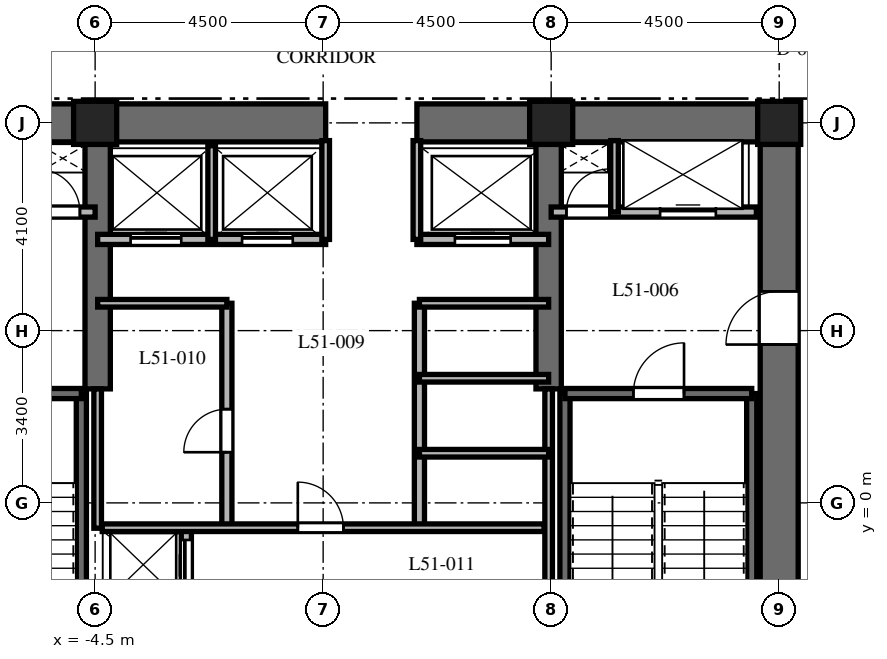
"""IFC4 building model, lengths in metres.
Left out: names, types, materials, properties, quantities, classifications, styles, units other than length and angle.
Written with IfcOpenShell. Run it as: python <this file> out.ifc"""

import sys

from ifc_helpers import new_model, si_unit, direction, frame, frame_2d, origin, origin_2d, place, context, subcontext, project, spatial, rectangle, extrude, element, fill, save


model = new_model("IFC4")
c1 = context("Model", 3, precision=1e-05, world=origin(), true_north=direction((0.0, 1.0)))
c2 = subcontext(c1, "Body", "Model", "MODEL_VIEW")
j1 = project(units=[si_unit("LENGTHUNIT", "METRE"), si_unit("PLANEANGLEUNIT", "RADIAN")], contexts=[c1])
p1 = place(None, origin())
s1 = spatial("IfcSite", under=j1, at=p1, CompositionType="ELEMENT")
p2 = place(p1, origin())
s2 = spatial("IfcBuilding", under=s1, at=p2, CompositionType="ELEMENT")
p3 = place(p2, frame((0.0, 0.0, 206.5)))
s3 = spatial("IfcBuildingStorey", under=s2, at=p3, CompositionType="ELEMENT", Elevation=206.5)
p4 = place(p3, frame((-9.375, 7.5, 0.0), z_axis=(0.0, 0.0, 1.0), x_axis=(1.0, 0.0, 0.0)))
e1 = element("IfcWall", 1, at=p4, inside=s3, PredefinedType="SHEAR", context=c2, shape_type="SweptSolid", body=[
    extrude(rectangle(XDim=9.425, YDim=0.75, at=frame_2d((4.712, 0.0))), origin(), (0.0, 0.0, 1.0), 3.8),
])
p5 = place(p3, frame((1.85, 7.5, 0.0), z_axis=(0.0, 0.0, 1.0), x_axis=(1.0, 0.0, 0.0)))
e2 = element("IfcWall", 2, at=p5, inside=s3, PredefinedType="SHEAR", context=c2, shape_type="SweptSolid", body=[
    extrude(rectangle(XDim=7.525, YDim=0.75, at=frame_2d((3.762, 0.0))), origin(), (0.0, 0.0, 1.0), 3.8),
])
p6 = place(p3, frame((9.0, -7.125, 0.0), z_axis=(0.0, 0.0, 1.0), x_axis=(0.0, 1.0, 0.0)))
e3 = element("IfcWall", 3, at=p6, inside=s3, PredefinedType="SHEAR", context=c2, shape_type="SweptSolid", body=[
    extrude(rectangle(XDim=14.25, YDim=0.75, at=frame_2d((7.125, 0.0))), origin(), (0.0, 0.0, 1.0), 3.8),
])
p7 = place(p6, frame((10.25, 0.0, 0.0)))
e4 = element("IfcOpeningElement", 4, at=p7, cuts=e3, PredefinedType="OPENING", context=c2, shape_type="SweptSolid", body=[
    extrude(rectangle(XDim=1.05, YDim=2.15, at=frame_2d((0.525, 1.075))), frame((0.0, 0.385, 0.0), z_axis=(0.0, -1.0, 0.0), x_axis=(1.0, 0.0, 0.0)), (0.0, 0.0, 1.0), 0.77),
])
for number, where, z_axis, x_axis in (
    (5, (-4.45, 2.25, 0.0), (0.0, 0.0, 1.0), (0.0, 1.0, 0.0)),
    (6, (4.45, 2.25, 0.0), (0.0, 0.0, 1.0), (0.0, 1.0, 0.0)),
):
    element("IfcWall", number, at=place(p3, frame(where, z_axis=z_axis, x_axis=x_axis)), inside=s3, PredefinedType="SHEAR", context=c2, shape_type="SweptSolid", body=[
        extrude(rectangle(XDim=4.875, YDim=0.5, at=frame_2d((2.438, 0.0))), origin(), (0.0, 0.0, 1.0), 3.8),
    ])
p8 = place(p3, frame((-4.772, -6.985, 0.0), z_axis=(0.0, 0.0, 1.0), x_axis=(0.0, 1.0, 0.0)))
e7 = element("IfcWall", 7, at=p8, inside=s3, PredefinedType="SHEAR", context=c2, shape_type="SweptSolid", body=[
    extrude(rectangle(XDim=9.143, YDim=0.2, at=frame_2d((4.572, 0.0))), origin(), (0.0, 0.0, 1.0), 3.8),
])
p9 = place(p3, frame((-8.458, 2.158, 0.0), z_axis=(0.0, 0.0, 1.0), x_axis=(1.0, 0.0, 0.0)))
e8 = element("IfcWall", 8, at=p9, inside=s3, PredefinedType="SHEAR", context=c2, shape_type="SweptSolid", body=[
    extrude(rectangle(XDim=3.686, YDim=0.2, at=frame_2d((1.843, 0.0))), origin(), (0.0, 0.0, 1.0), 3.8),
])
p10 = place(p9, frame((1.3, 0.0, 0.0)))
e9 = element("IfcOpeningElement", 9, at=p10, cuts=e8, PredefinedType="OPENING", context=c2, shape_type="SweptSolid", body=[
    extrude(rectangle(XDim=1.0, YDim=2.15, at=frame_2d((0.5, 1.075))), frame((0.0, 0.11, 0.0), z_axis=(0.0, -1.0, 0.0), x_axis=(1.0, 0.0, 0.0)), (0.0, 0.0, 1.0), 0.22),
])
for number, where, z_axis, x_axis in (
    (10, (4.772, -6.985, 0.0), (0.0, 0.0, 1.0), (0.0, 1.0, 0.0)),
    (11, (8.458, -6.985, 0.0), (0.0, 0.0, 1.0), (0.0, 1.0, 0.0)),
):
    element("IfcWall", number, at=place(p3, frame(where, z_axis=z_axis, x_axis=x_axis)), inside=s3, PredefinedType="SHEAR", context=c2, shape_type="SweptSolid", body=[
        extrude(rectangle(XDim=9.143, YDim=0.2, at=frame_2d((4.572, 0.0))), origin(), (0.0, 0.0, 1.0), 3.8),
    ])
p11 = place(p3, frame((4.772, 2.158, 0.0), z_axis=(0.0, 0.0, 1.0), x_axis=(1.0, 0.0, 0.0)))
e12 = element("IfcWall", 12, at=p11, inside=s3, PredefinedType="SHEAR", context=c2, shape_type="SweptSolid", body=[
    extrude(rectangle(XDim=3.686, YDim=0.2, at=frame_2d((1.843, 0.0))), origin(), (0.0, 0.0, 1.0), 3.8),
])
p12 = place(p11, frame((1.35, 0.0, 0.0)))
e13 = element("IfcOpeningElement", 13, at=p12, cuts=e12, PredefinedType="OPENING", context=c2, shape_type="SweptSolid", body=[
    extrude(rectangle(XDim=1.0, YDim=2.15, at=frame_2d((0.5, 1.075))), frame((0.0, 0.11, 0.0), z_axis=(0.0, -1.0, 0.0), x_axis=(1.0, 0.0, 0.0)), (0.0, 0.0, 1.0), 0.22),
])
for number, where, z_axis, x_axis in (
    (14, (9.0, 7.5, 0.0), (0.0, 0.0, 1.0), (1.0, 0.0, 0.0)),
    (15, (4.5, 7.5, 0.0), (0.0, 0.0, 1.0), (1.0, 0.0, 0.0)),
    (16, (-4.5, 7.5, 0.0), (0.0, 0.0, 1.0), (1.0, 0.0, 0.0)),
):
    element("IfcColumn", number, at=place(p3, frame(where, z_axis=z_axis, x_axis=x_axis)), inside=s3, PredefinedType="COLUMN", context=c2, shape_type="SweptSolid", body=[
        extrude(rectangle(XDim=0.85, YDim=0.85, at=origin_2d()), origin(), (0.0, 0.0, 1.0), 3.8),
    ])
p13 = place(p3, frame((-8.55, 5.74, 0.0), z_axis=(0.0, 0.0, 1.0), x_axis=(1.0, 0.0, 0.0)))
e17 = element("IfcWall", 17, at=p13, inside=s3, PredefinedType="PARTITIONING", context=c2, shape_type="SweptSolid", body=[
    extrude(rectangle(XDim=4.05, YDim=0.2, at=frame_2d((2.025, 0.0))), origin(), (0.0, 0.0, 1.0), 3.5),
])
p14 = place(p13, frame((0.75, 0.0, 0.0)))
e18 = element("IfcOpeningElement", 18, at=p14, cuts=e17, PredefinedType="OPENING", context=c2, shape_type="SweptSolid", body=[
    extrude(rectangle(XDim=1.1, YDim=2.2, at=frame_2d((0.55, 1.1))), frame((0.0, 0.11, 0.0), z_axis=(0.0, -1.0, 0.0), x_axis=(1.0, 0.0, 0.0)), (0.0, 0.0, 1.0), 0.22),
])
p15 = place(p13, frame((2.9, 0.0, 0.0)))
e19 = element("IfcOpeningElement", 19, at=p15, cuts=e17, PredefinedType="OPENING", context=c2, shape_type="SweptSolid", body=[
    extrude(rectangle(XDim=0.85, YDim=2.03, at=frame_2d((0.425, 1.015))), frame((0.0, 0.11, 0.0), z_axis=(0.0, -1.0, 0.0), x_axis=(1.0, 0.0, 0.0)), (0.0, 0.0, 1.0), 0.22),
])
p16 = place(p3, frame((4.5, 5.74, 0.0), z_axis=(0.0, 0.0, 1.0), x_axis=(1.0, 0.0, 0.0)))
e20 = element("IfcWall", 20, at=p16, inside=s3, PredefinedType="PARTITIONING", context=c2, shape_type="SweptSolid", body=[
    extrude(rectangle(XDim=4.05, YDim=0.2, at=frame_2d((2.025, 0.0))), origin(), (0.0, 0.0, 1.0), 3.5),
])
p17 = place(p16, frame((0.3, 0.0, 0.0)))
e21 = element("IfcOpeningElement", 21, at=p17, cuts=e20, PredefinedType="OPENING", context=c2, shape_type="SweptSolid", body=[
    extrude(rectangle(XDim=0.85, YDim=2.03, at=frame_2d((0.425, 1.015))), frame((0.0, 0.11, 0.0), z_axis=(0.0, -1.0, 0.0), x_axis=(1.0, 0.0, 0.0)), (0.0, 0.0, 1.0), 0.22),
])
p18 = place(p16, frame((2.15, 0.0, 0.0)))
e22 = element("IfcOpeningElement", 22, at=p18, cuts=e20, PredefinedType="OPENING", context=c2, shape_type="SweptSolid", body=[
    extrude(rectangle(XDim=1.1, YDim=2.2, at=frame_2d((0.55, 1.1))), frame((0.0, 0.11, 0.0), z_axis=(0.0, -1.0, 0.0), x_axis=(1.0, 0.0, 0.0)), (0.0, 0.0, 1.0), 0.22),
])
p19 = place(p3, frame((5.75, 5.74, 0.0), z_axis=(0.0, 0.0, 1.0), x_axis=(0.0, 1.0, 0.0)))
e23 = element("IfcWall", 23, at=p19, inside=s3, PredefinedType="PARTITIONING", context=c2, shape_type="SweptSolid", body=[
    extrude(rectangle(XDim=1.41, YDim=0.15, at=frame_2d((0.705, 0.0))), origin(), (0.0, 0.0, 1.0), 3.5),
])
p20 = place(p3, frame((-2.7, -1.972, 0.0), z_axis=(0.0, 0.0, 1.0), x_axis=(0.0, 1.0, 0.0)))
e24 = element("IfcWall", 24, at=p20, inside=s3, PredefinedType="PARTITIONING", context=c2, shape_type="SweptSolid", body=[
    extrude(rectangle(XDim=1.472, YDim=0.2, at=frame_2d((0.736, 0.0))), origin(), (0.0, 0.0, 1.0), 3.5),
])
p21 = place(p20, frame((0.24, 0.0, 0.0)))
e25 = element("IfcOpeningElement", 25, at=p21, cuts=e24, PredefinedType="OPENING", context=c2, shape_type="SweptSolid", body=[
    extrude(rectangle(XDim=1.0, YDim=2.2, at=frame_2d((0.5, 1.1))), frame((0.0, 0.11, 0.0), z_axis=(0.0, -1.0, 0.0), x_axis=(1.0, 0.0, 0.0)), (0.0, 0.0, 1.0), 0.22),
])
p22 = place(p3, frame((-4.45, 5.2, 0.0), z_axis=(0.0, 0.0, 1.0), x_axis=(1.0, 0.0, 0.0)))
e26 = element("IfcWall", 26, at=p22, inside=s3, PredefinedType="PARTITIONING", context=c2, shape_type="SweptSolid", body=[
    extrude(rectangle(XDim=4.5, YDim=0.2, at=frame_2d((2.25, 0.0))), origin(), (0.0, 0.0, 1.0), 3.5),
])
p23 = place(p22, frame((0.65, 0.0, 0.0)))
e27 = element("IfcOpeningElement", 27, at=p23, cuts=e26, PredefinedType="OPENING", context=c2, shape_type="SweptSolid", body=[
    extrude(rectangle(XDim=1.0, YDim=2.2, at=frame_2d((0.5, 1.1))), frame((0.0, 0.11, 0.0), z_axis=(0.0, -1.0, 0.0), x_axis=(1.0, 0.0, 0.0)), (0.0, 0.0, 1.0), 0.22),
])
p24 = place(p22, frame((2.85, 0.0, 0.0)))
e28 = element("IfcOpeningElement", 28, at=p24, cuts=e26, PredefinedType="OPENING", context=c2, shape_type="SweptSolid", body=[
    extrude(rectangle(XDim=1.0, YDim=2.2, at=frame_2d((0.5, 1.1))), frame((0.0, 0.11, 0.0), z_axis=(0.0, -1.0, 0.0), x_axis=(1.0, 0.0, 0.0)), (0.0, 0.0, 1.0), 0.22),
])
p25 = place(p3, frame((1.85, 5.2, 0.0), z_axis=(0.0, 0.0, 1.0), x_axis=(1.0, 0.0, 0.0)))
e29 = element("IfcWall", 29, at=p25, inside=s3, PredefinedType="PARTITIONING", context=c2, shape_type="SweptSolid", body=[
    extrude(rectangle(XDim=2.6, YDim=0.2, at=frame_2d((1.3, 0.0))), origin(), (0.0, 0.0, 1.0), 3.5),
])
p26 = place(p25, frame((0.75, 0.0, 0.0)))
e30 = element("IfcOpeningElement", 30, at=p26, cuts=e29, PredefinedType="OPENING", context=c2, shape_type="SweptSolid", body=[
    extrude(rectangle(XDim=1.1, YDim=2.2, at=frame_2d((0.55, 1.1))), frame((0.0, 0.11, 0.0), z_axis=(0.0, -1.0, 0.0), x_axis=(1.0, 0.0, 0.0)), (0.0, 0.0, 1.0), 0.22),
])
p27 = place(p3, frame((-2.2, 5.2, 0.0), z_axis=(0.0, 0.0, 1.0), x_axis=(0.0, 1.0, 0.0)))
e31 = element("IfcWall", 31, at=p27, inside=s3, PredefinedType="PARTITIONING", context=c2, shape_type="SweptSolid", body=[
    extrude(rectangle(XDim=1.85, YDim=0.15, at=frame_2d((0.925, 0.0))), origin(), (0.0, 0.0, 1.0), 3.5),
])
for number, where, z_axis, x_axis in (
    (32, (0.05, 5.2, 0.0), (0.0, 0.0, 1.0), (0.0, 1.0, 0.0)),
    (33, (1.85, 5.2, 0.0), (0.0, 0.0, 1.0), (0.0, 1.0, 0.0)),
):
    element("IfcWall", number, at=place(p3, frame(where, z_axis=z_axis, x_axis=x_axis)), inside=s3, PredefinedType="PARTITIONING", context=c2, shape_type="SweptSolid", body=[
        extrude(rectangle(XDim=1.95, YDim=0.15, at=frame_2d((0.975, 0.0))), origin(), (0.0, 0.0, 1.0), 3.5),
    ])
p28 = place(p3, frame((-4.45, -0.5, 0.0), z_axis=(0.0, 0.0, 1.0), x_axis=(0.0, 1.0, 0.0)))
e34 = element("IfcWall", 34, at=p28, inside=s3, PredefinedType="PARTITIONING", context=c2, shape_type="SweptSolid", body=[
    extrude(rectangle(XDim=2.75, YDim=0.15, at=frame_2d((1.375, 0.0))), origin(), (0.0, 0.0, 1.0), 3.5),
])
p29 = place(p3, frame((4.45, -1.972, 0.0), z_axis=(0.0, 0.0, 1.0), x_axis=(0.0, 1.0, 0.0)))
e35 = element("IfcWall", 35, at=p29, inside=s3, PredefinedType="PARTITIONING", context=c2, shape_type="SweptSolid", body=[
    extrude(rectangle(XDim=4.222, YDim=0.15, at=frame_2d((2.111, 0.0))), origin(), (0.0, 0.0, 1.0), 3.5),
])
p30 = place(p3, frame((-1.9, -0.5, 0.0), z_axis=(0.0, 0.0, 1.0), x_axis=(0.0, 1.0, 0.0)))
e36 = element("IfcWall", 36, at=p30, inside=s3, PredefinedType="PARTITIONING", context=c2, shape_type="SweptSolid", body=[
    extrude(rectangle(XDim=4.44, YDim=0.2, at=frame_2d((2.22, 0.0))), origin(), (0.0, 0.0, 1.0), 3.5),
])
p31 = place(p30, frame((1.5, 0.0, 0.0)))
e37 = element("IfcOpeningElement", 37, at=p31, cuts=e36, PredefinedType="OPENING", context=c2, shape_type="SweptSolid", body=[
    extrude(rectangle(XDim=0.85, YDim=2.03, at=frame_2d((0.425, 1.015))), frame((0.0, 0.11, 0.0), z_axis=(0.0, -1.0, 0.0), x_axis=(1.0, 0.0, 0.0)), (0.0, 0.0, 1.0), 0.22),
])
p32 = place(p3, frame((-4.45, 3.94, 0.0), z_axis=(0.0, 0.0, 1.0), x_axis=(1.0, 0.0, 0.0)))
e38 = element("IfcWall", 38, at=p32, inside=s3, PredefinedType="PARTITIONING", context=c2, shape_type="SweptSolid", body=[
    extrude(rectangle(XDim=2.55, YDim=0.15, at=frame_2d((1.275, 0.0))), origin(), (0.0, 0.0, 1.0), 3.5),
])
p33 = place(p3, frame((1.9, -0.5, 0.0), z_axis=(0.0, 0.0, 1.0), x_axis=(0.0, 1.0, 0.0)))
e39 = element("IfcWall", 39, at=p33, inside=s3, PredefinedType="PARTITIONING", context=c2, shape_type="SweptSolid", body=[
    extrude(rectangle(XDim=4.44, YDim=0.2, at=frame_2d((2.22, 0.0))), origin(), (0.0, 0.0, 1.0), 3.5),
])
for number, where, z_axis, x_axis in (
    (40, (1.9, 3.94, 0.0), (0.0, 0.0, 1.0), (1.0, 0.0, 0.0)),
    (41, (1.9, 0.98, 0.0), (0.0, 0.0, 1.0), (1.0, 0.0, 0.0)),
    (42, (1.9, 2.46, 0.0), (0.0, 0.0, 1.0), (1.0, 0.0, 0.0)),
):
    element("IfcWall", number, at=place(p3, frame(where, z_axis=z_axis, x_axis=x_axis)), inside=s3, PredefinedType="PARTITIONING", context=c2, shape_type="SweptSolid", body=[
        extrude(rectangle(XDim=2.55, YDim=0.15, at=frame_2d((1.275, 0.0))), origin(), (0.0, 0.0, 1.0), 3.5),
    ])
p34 = place(p3, frame((-4.36, -0.49, 0.0), z_axis=(0.0, 0.0, 1.0), x_axis=(1.0, 0.0, 0.0)))
e43 = element("IfcWall", 43, at=p34, inside=s3, PredefinedType="PARTITIONING", context=c2, shape_type="SweptSolid", body=[
    extrude(rectangle(XDim=8.72, YDim=0.15, at=frame_2d((4.36, 0.0))), origin(), (0.0, 0.0, 1.0), 3.5),
])
p35 = place(p34, frame((3.86, 0.0, 0.0)))
e44 = element("IfcOpeningElement", 44, at=p35, cuts=e43, PredefinedType="OPENING", context=c2, shape_type="SweptSolid", body=[
    extrude(rectangle(XDim=0.9, YDim=2.03, at=frame_2d((0.45, 1.015))), frame((0.0, 0.085, 0.0), z_axis=(0.0, -1.0, 0.0), x_axis=(1.0, 0.0, 0.0)), (0.0, 0.0, 1.0), 0.17),
])
p36 = place(p12, origin())
e45 = element("IfcDoor", 45, at=p36, inside=s3, OperationType="SINGLE_SWING_RIGHT", PredefinedType="DOOR", context=c2, shape_type="SweptSolid", body=[
    extrude(rectangle(XDim=1.0, YDim=2.15, at=frame_2d((0.5, 1.075))), frame((0.0, 0.025, 0.0), z_axis=(0.0, -1.0, 0.0), x_axis=(1.0, 0.0, 0.0)), (0.0, 0.0, 1.0), 0.05),
])
fill(e13, e45)
p37 = place(p7, origin())
e46 = element("IfcDoor", 46, at=p37, inside=s3, OperationType="SINGLE_SWING_LEFT", PredefinedType="DOOR", context=c2, shape_type="SweptSolid", body=[
    extrude(rectangle(XDim=1.05, YDim=2.15, at=frame_2d((0.525, 1.075))), frame((0.0, 0.025, 0.0), z_axis=(0.0, -1.0, 0.0), x_axis=(1.0, 0.0, 0.0)), (0.0, 0.0, 1.0), 0.05),
])
fill(e4, e46)
p38 = place(p15, origin())
e47 = element("IfcDoor", 47, at=p38, inside=s3, OperationType="SINGLE_SWING_LEFT", PredefinedType="DOOR", context=c2, shape_type="SweptSolid", body=[
    extrude(rectangle(XDim=0.85, YDim=2.03, at=frame_2d((0.425, 1.015))), frame((0.0, 0.025, 0.0), z_axis=(0.0, -1.0, 0.0), x_axis=(1.0, 0.0, 0.0)), (0.0, 0.0, 1.0), 0.05),
])
fill(e19, e47)
p39 = place(p17, origin())
e48 = element("IfcDoor", 48, at=p39, inside=s3, OperationType="SINGLE_SWING_RIGHT", PredefinedType="DOOR", context=c2, shape_type="SweptSolid", body=[
    extrude(rectangle(XDim=0.85, YDim=2.03, at=frame_2d((0.425, 1.015))), frame((0.0, 0.025, 0.0), z_axis=(0.0, -1.0, 0.0), x_axis=(1.0, 0.0, 0.0)), (0.0, 0.0, 1.0), 0.05),
])
fill(e21, e48)
p40 = place(p18, origin())
e49 = element("IfcDoor", 49, at=p40, inside=s3, OperationType="SLIDING_TO_RIGHT", PredefinedType="DOOR", context=c2, shape_type="SweptSolid", body=[
    extrude(rectangle(XDim=1.1, YDim=2.2, at=frame_2d((0.55, 1.1))), frame((0.0, 0.025, 0.0), z_axis=(0.0, -1.0, 0.0), x_axis=(1.0, 0.0, 0.0)), (0.0, 0.0, 1.0), 0.05),
])
fill(e22, e49)
p41 = place(p21, origin())
e50 = element("IfcDoor", 50, at=p41, inside=s3, OperationType="SLIDING_TO_LEFT", PredefinedType="DOOR", context=c2, shape_type="SweptSolid", body=[
    extrude(rectangle(XDim=1.0, YDim=2.2, at=frame_2d((0.5, 1.1))), frame((0.0, 0.025, 0.0), z_axis=(0.0, -1.0, 0.0), x_axis=(1.0, 0.0, 0.0)), (0.0, 0.0, 1.0), 0.05),
])
fill(e25, e50)
p42 = place(p23, origin())
e51 = element("IfcDoor", 51, at=p42, inside=s3, OperationType="SLIDING_TO_LEFT", PredefinedType="DOOR", context=c2, shape_type="SweptSolid", body=[
    extrude(rectangle(XDim=1.0, YDim=2.2, at=frame_2d((0.5, 1.1))), frame((0.0, 0.025, 0.0), z_axis=(0.0, -1.0, 0.0), x_axis=(1.0, 0.0, 0.0)), (0.0, 0.0, 1.0), 0.05),
])
fill(e27, e51)
p43 = place(p24, origin())
e52 = element("IfcDoor", 52, at=p43, inside=s3, OperationType="SLIDING_TO_RIGHT", PredefinedType="DOOR", context=c2, shape_type="SweptSolid", body=[
    extrude(rectangle(XDim=1.0, YDim=2.2, at=frame_2d((0.5, 1.1))), frame((0.0, 0.025, 0.0), z_axis=(0.0, -1.0, 0.0), x_axis=(1.0, 0.0, 0.0)), (0.0, 0.0, 1.0), 0.05),
])
fill(e28, e52)
p44 = place(p26, origin())
e53 = element("IfcDoor", 53, at=p44, inside=s3, OperationType="SLIDING_TO_RIGHT", PredefinedType="DOOR", context=c2, shape_type="SweptSolid", body=[
    extrude(rectangle(XDim=1.1, YDim=2.2, at=frame_2d((0.55, 1.1))), frame((0.0, 0.025, 0.0), z_axis=(0.0, -1.0, 0.0), x_axis=(1.0, 0.0, 0.0)), (0.0, 0.0, 1.0), 0.05),
])
fill(e30, e53)
p45 = place(p31, origin())
e54 = element("IfcDoor", 54, at=p45, inside=s3, OperationType="SINGLE_SWING_LEFT", PredefinedType="DOOR", context=c2, shape_type="SweptSolid", body=[
    extrude(rectangle(XDim=0.85, YDim=2.03, at=frame_2d((0.425, 1.015))), frame((0.0, 0.025, 0.0), z_axis=(0.0, -1.0, 0.0), x_axis=(1.0, 0.0, 0.0)), (0.0, 0.0, 1.0), 0.05),
])
fill(e37, e54)
p46 = place(p35, origin())
e55 = element("IfcDoor", 55, at=p46, inside=s3, OperationType="SINGLE_SWING_LEFT", PredefinedType="DOOR", context=c2, shape_type="SweptSolid", body=[
    extrude(rectangle(XDim=0.9, YDim=2.03, at=frame_2d((0.45, 1.015))), frame((0.0, 0.025, 0.0), z_axis=(0.0, -1.0, 0.0), x_axis=(1.0, 0.0, 0.0)), (0.0, 0.0, 1.0), 0.05),
])
fill(e44, e55)
save(model, sys.argv[1])
